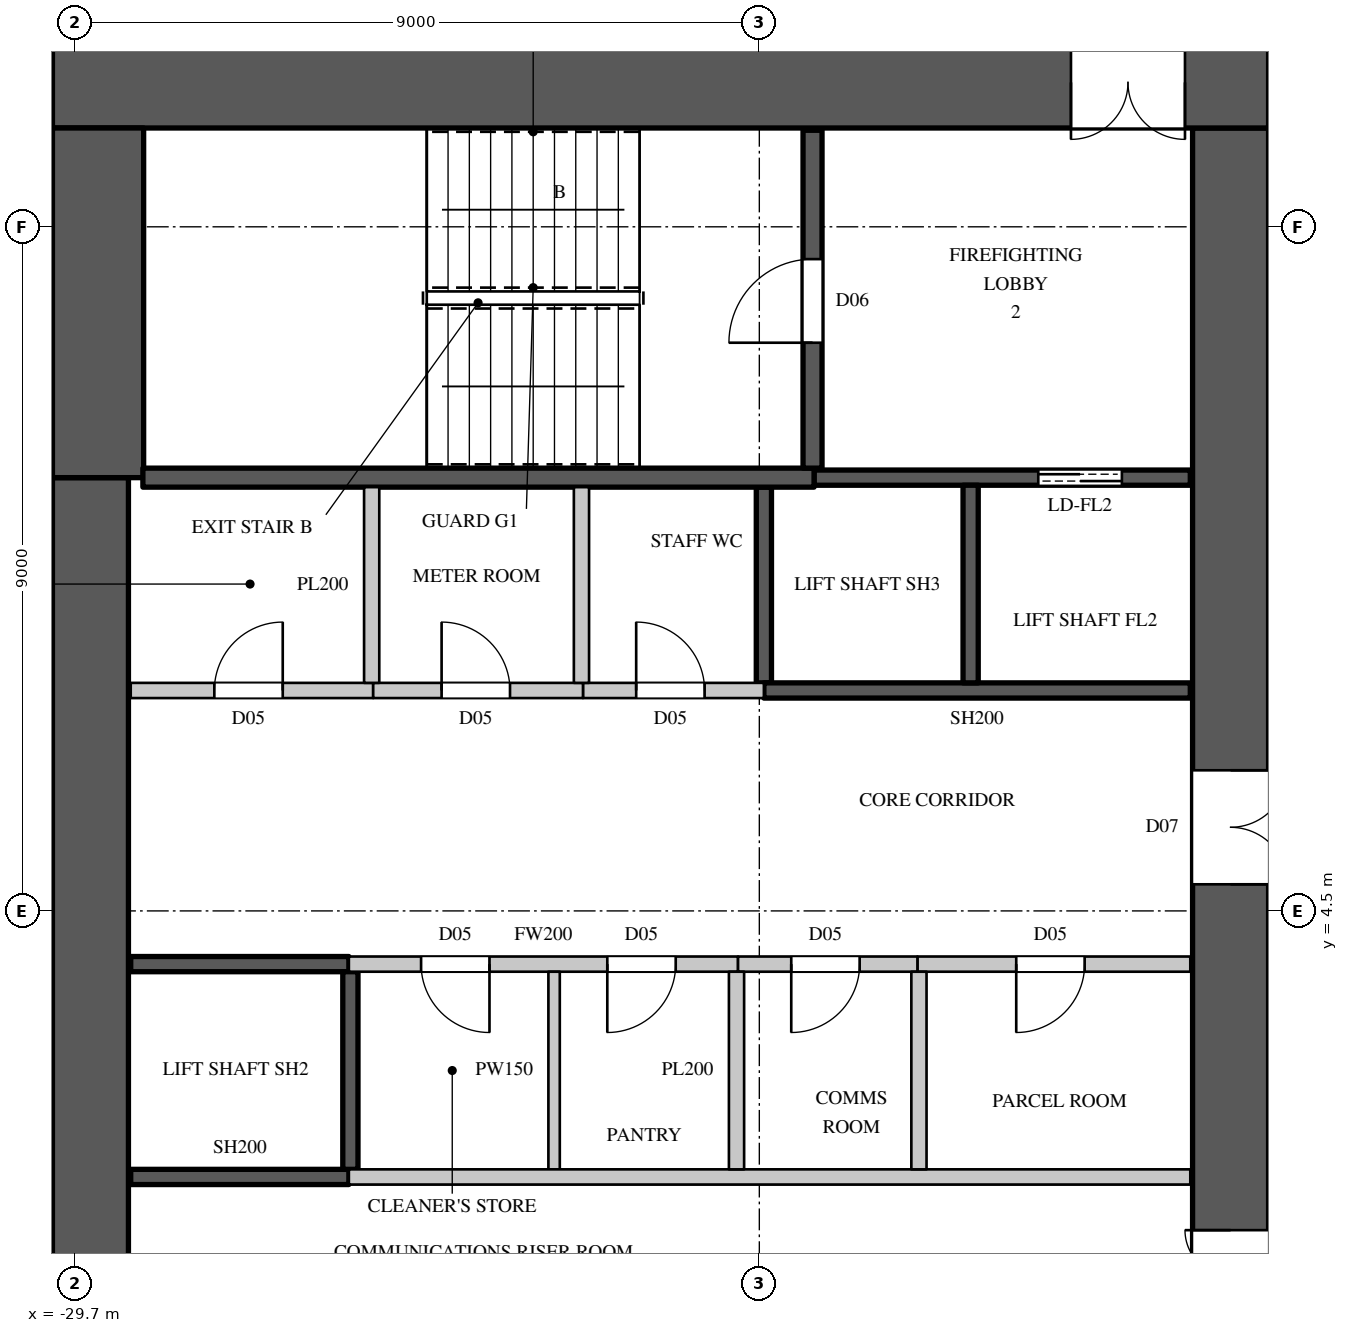
"""IFC4 building model, lengths in metres.
Left out: names, types, materials, properties, quantities, classifications, styles, units other than length and angle.
Written with IfcOpenShell. Run it as: python <this file> out.ifc"""

import sys

from ifc_helpers import new_model, si_unit, direction, frame, frame_2d, origin, place, context, subcontext, project, spatial, rectangle, extrude, element, fill, save


model = new_model("IFC4")
c1 = context("Model", 3, precision=1e-05, world=origin(), true_north=direction((0.0, 1.0)))
c2 = subcontext(c1, "Body", "Model", "MODEL_VIEW")
j1 = project(units=[si_unit("LENGTHUNIT", "METRE"), si_unit("PLANEANGLEUNIT", "RADIAN")], contexts=[c1])
p1 = place(None, origin())
s1 = spatial("IfcSite", under=j1, at=p1, CompositionType="ELEMENT")
p2 = place(p1, origin())
s2 = spatial("IfcBuilding", under=s1, at=p2, CompositionType="ELEMENT")
p3 = place(p2, frame((0.0, 0.0, 84.3)))
s3 = spatial("IfcBuildingStorey", under=s2, at=p3, CompositionType="ELEMENT", Elevation=84.3)
p4 = place(p3, frame((-30.0, 15.4, 0.0), z_axis=(0.0, 0.0, 1.0), x_axis=(1.0, 0.0, 0.0)))
e1 = element("IfcWall", 1, at=p4, inside=s3, PredefinedType="SHEAR", context=c2, shape_type="SweptSolid", body=[
    extrude(rectangle(XDim=16.0, YDim=1.2, at=frame_2d((8.0, 0.0))), origin(), (0.0, 0.0, 1.0), 3.6),
])
p5 = place(p4, frame((13.4, 0.0, 0.0)))
e2 = element("IfcOpeningElement", 2, at=p5, cuts=e1, PredefinedType="OPENING", context=c2, shape_type="SweptSolid", body=[
    extrude(rectangle(XDim=1.5, YDim=2.4, at=frame_2d((0.75, 1.2))), frame((0.0, 0.61, 0.0), z_axis=(0.0, -1.0, 0.0), x_axis=(1.0, 0.0, 0.0)), (0.0, 0.0, 1.0), 1.22),
])
p6 = place(p3, frame((-14.5, -14.8, 0.0), z_axis=(0.0, 0.0, 1.0), x_axis=(0.0, 1.0, 0.0)))
e3 = element("IfcWall", 3, at=p6, inside=s3, PredefinedType="SHEAR", context=c2, shape_type="SweptSolid", body=[
    extrude(rectangle(XDim=29.6, YDim=1.0, at=frame_2d((14.8, 0.0))), origin(), (0.0, 0.0, 1.0), 3.6),
])
p7 = place(p6, frame((8.45, 0.0, 0.0)))
e4 = element("IfcOpeningElement", 4, at=p7, cuts=e3, PredefinedType="OPENING", context=c2, shape_type="SweptSolid", body=[
    extrude(rectangle(XDim=1.5, YDim=2.4, at=frame_2d((0.75, 1.2))), frame((0.0, 0.51, 0.0), z_axis=(0.0, -1.0, 0.0), x_axis=(1.0, 0.0, 0.0)), (0.0, 0.0, 1.0), 1.02),
])
p8 = place(p6, frame((19.65, 0.0, 0.0)))
e5 = element("IfcOpeningElement", 5, at=p8, cuts=e3, PredefinedType="OPENING", context=c2, shape_type="SweptSolid", body=[
    extrude(rectangle(XDim=1.5, YDim=2.4, at=frame_2d((0.75, 1.2))), frame((0.0, 0.51, 0.0), z_axis=(0.0, -1.0, 0.0), x_axis=(1.0, 0.0, 0.0)), (0.0, 0.0, 1.0), 1.02),
])
p9 = place(p6, frame((14.5, 0.0, 0.0)))
e6 = element("IfcOpeningElement", 6, at=p9, cuts=e3, PredefinedType="OPENING", context=c2, shape_type="SweptSolid", body=[
    extrude(rectangle(XDim=0.6, YDim=2.0, at=frame_2d((0.3, 1.0))), frame((0.0, 0.51, 0.0), z_axis=(0.0, -1.0, 0.0), x_axis=(1.0, 0.0, 0.0)), (0.0, 0.0, 1.0), 1.02),
])
p10 = place(p3, frame((-29.5, -10.2, 0.0), z_axis=(0.0, 0.0, 1.0), x_axis=(0.0, 1.0, 0.0)))
e7 = element("IfcWall", 7, at=p10, inside=s3, PredefinedType="SHEAR", context=c2, shape_type="SweptSolid", body=[
    extrude(rectangle(XDim=20.4, YDim=1.0, at=frame_2d((10.2, 0.0))), origin(), (0.0, 0.0, 1.0), 3.6),
])
p11 = place(p3, frame((-29.4, 10.2, 0.0), z_axis=(0.0, 0.0, 1.0), x_axis=(0.0, 1.0, 0.0)))
e8 = element("IfcWall", 8, at=p11, inside=s3, PredefinedType="SHEAR", context=c2, shape_type="SweptSolid", body=[
    extrude(rectangle(XDim=4.6, YDim=1.2, at=frame_2d((2.3, 0.0))), origin(), (0.0, 0.0, 1.0), 3.6),
])
p12 = place(p3, frame((-28.97, 7.4, 0.0), z_axis=(0.0, 0.0, 1.0), x_axis=(1.0, 0.0, 0.0)))
e9 = element("IfcWall", 9, at=p12, inside=s3, PredefinedType="PARTITIONING", context=c2, shape_type="SweptSolid", body=[
    extrude(rectangle(XDim=3.19, YDim=0.2, at=frame_2d((1.595, 0.0))), origin(), (0.0, 0.0, 1.0), 3.3),
])
p13 = place(p12, frame((1.1, 0.0, 0.0)))
e10 = element("IfcOpeningElement", 10, at=p13, cuts=e9, PredefinedType="OPENING", context=c2, shape_type="SweptSolid", body=[
    extrude(rectangle(XDim=0.9, YDim=2.2, at=frame_2d((0.45, 1.1))), frame((0.0, 0.11, 0.0), z_axis=(0.0, -1.0, 0.0), x_axis=(1.0, 0.0, 0.0)), (0.0, 0.0, 1.0), 0.22),
])
p14 = place(p3, frame((-26.1, 3.8, 0.0), z_axis=(0.0, 0.0, 1.0), x_axis=(1.0, 0.0, 0.0)))
e11 = element("IfcWall", 11, at=p14, inside=s3, PredefinedType="PARTITIONING", context=c2, shape_type="SweptSolid", body=[
    extrude(rectangle(XDim=5.12, YDim=0.2, at=frame_2d((2.56, 0.0))), origin(), (0.0, 0.0, 1.0), 3.3),
])
p15 = place(p14, frame((0.95, 0.0, 0.0)))
e12 = element("IfcOpeningElement", 12, at=p15, cuts=e11, PredefinedType="OPENING", context=c2, shape_type="SweptSolid", body=[
    extrude(rectangle(XDim=0.9, YDim=2.2, at=frame_2d((0.45, 1.1))), frame((0.0, 0.11, 0.0), z_axis=(0.0, -1.0, 0.0), x_axis=(1.0, 0.0, 0.0)), (0.0, 0.0, 1.0), 0.22),
])
p16 = place(p14, frame((3.4, 0.0, 0.0)))
e13 = element("IfcOpeningElement", 13, at=p16, cuts=e11, PredefinedType="OPENING", context=c2, shape_type="SweptSolid", body=[
    extrude(rectangle(XDim=0.9, YDim=2.2, at=frame_2d((0.45, 1.1))), frame((0.0, 0.11, 0.0), z_axis=(0.0, -1.0, 0.0), x_axis=(1.0, 0.0, 0.0)), (0.0, 0.0, 1.0), 0.22),
])
p17 = place(p3, frame((-23.02, 7.4, 0.0), z_axis=(0.0, 0.0, 1.0), x_axis=(1.0, 0.0, 0.0)))
e14 = element("IfcWall", 14, at=p17, inside=s3, PredefinedType="PARTITIONING", context=c2, shape_type="SweptSolid", body=[
    extrude(rectangle(XDim=2.38, YDim=0.2, at=frame_2d((1.19, 0.0))), origin(), (0.0, 0.0, 1.0), 3.3),
])
p18 = place(p17, frame((0.7, 0.0, 0.0)))
e15 = element("IfcOpeningElement", 15, at=p18, cuts=e14, PredefinedType="OPENING", context=c2, shape_type="SweptSolid", body=[
    extrude(rectangle(XDim=0.9, YDim=2.2, at=frame_2d((0.45, 1.1))), frame((0.0, 0.11, 0.0), z_axis=(0.0, -1.0, 0.0), x_axis=(1.0, 0.0, 0.0)), (0.0, 0.0, 1.0), 0.22),
])
p19 = place(p3, frame((-18.62, 3.8, 0.0), z_axis=(0.0, 0.0, 1.0), x_axis=(1.0, 0.0, 0.0)))
e16 = element("IfcWall", 16, at=p19, inside=s3, PredefinedType="PARTITIONING", context=c2, shape_type="SweptSolid", body=[
    extrude(rectangle(XDim=3.59, YDim=0.2, at=frame_2d((1.795, 0.0))), origin(), (0.0, 0.0, 1.0), 3.3),
])
p20 = place(p19, frame((1.3, 0.0, 0.0)))
e17 = element("IfcOpeningElement", 17, at=p20, cuts=e16, PredefinedType="OPENING", context=c2, shape_type="SweptSolid", body=[
    extrude(rectangle(XDim=0.9, YDim=2.2, at=frame_2d((0.45, 1.1))), frame((0.0, 0.11, 0.0), z_axis=(0.0, -1.0, 0.0), x_axis=(1.0, 0.0, 0.0)), (0.0, 0.0, 1.0), 0.22),
])
p21 = place(p3, frame((-23.4, 1.1, 0.0), z_axis=(0.0, 0.0, 1.0), x_axis=(0.0, 1.0, 0.0)))
e18 = element("IfcWall", 18, at=p21, inside=s3, PredefinedType="PARTITIONING", context=c2, shape_type="SweptSolid", body=[
    extrude(rectangle(XDim=2.6, YDim=0.15, at=frame_2d((1.3, 0.0))), origin(), (0.0, 0.0, 1.0), 3.3),
])
p22 = place(p3, frame((-26.1, 1.0, 0.0), z_axis=(0.0, 0.0, 1.0), x_axis=(1.0, 0.0, 0.0)))
e19 = element("IfcWall", 19, at=p22, inside=s3, PredefinedType="PARTITIONING", context=c2, shape_type="SweptSolid", body=[
    extrude(rectangle(XDim=11.07, YDim=0.2, at=frame_2d((5.535, 0.0))), origin(), (0.0, 0.0, 1.0), 3.3),
])
p23 = place(p3, frame((-25.78, 7.4, 0.0), z_axis=(0.0, 0.0, 1.0), x_axis=(1.0, 0.0, 0.0)))
e20 = element("IfcWall", 20, at=p23, inside=s3, PredefinedType="PARTITIONING", context=c2, shape_type="SweptSolid", body=[
    extrude(rectangle(XDim=2.76, YDim=0.2, at=frame_2d((1.38, 0.0))), origin(), (0.0, 0.0, 1.0), 3.3),
])
p24 = place(p23, frame((0.9, 0.0, 0.0)))
e21 = element("IfcOpeningElement", 21, at=p24, cuts=e20, PredefinedType="OPENING", context=c2, shape_type="SweptSolid", body=[
    extrude(rectangle(XDim=0.9, YDim=2.2, at=frame_2d((0.45, 1.1))), frame((0.0, 0.11, 0.0), z_axis=(0.0, -1.0, 0.0), x_axis=(1.0, 0.0, 0.0)), (0.0, 0.0, 1.0), 0.22),
])
for number, where, z_axis, x_axis in (
    (22, (-25.8, 7.5, 0.0), (0.0, 0.0, 1.0), (0.0, 1.0, 0.0)),
    (23, (-23.04, 7.5, 0.0), (0.0, 0.0, 1.0), (0.0, 1.0, 0.0)),
):
    element("IfcWall", number, at=place(p3, frame(where, z_axis=z_axis, x_axis=x_axis)), inside=s3, PredefinedType="PARTITIONING", context=c2, shape_type="SweptSolid", body=[
        extrude(rectangle(XDim=2.575, YDim=0.2, at=frame_2d((1.288, 0.0))), origin(), (0.0, 0.0, 1.0), 3.3),
    ])
p25 = place(p3, frame((-20.98, 3.8, 0.0), z_axis=(0.0, 0.0, 1.0), x_axis=(1.0, 0.0, 0.0)))
e24 = element("IfcWall", 24, at=p25, inside=s3, PredefinedType="PARTITIONING", context=c2, shape_type="SweptSolid", body=[
    extrude(rectangle(XDim=2.36, YDim=0.2, at=frame_2d((1.18, 0.0))), origin(), (0.0, 0.0, 1.0), 3.3),
])
p26 = place(p25, frame((0.7, 0.0, 0.0)))
e25 = element("IfcOpeningElement", 25, at=p26, cuts=e24, PredefinedType="OPENING", context=c2, shape_type="SweptSolid", body=[
    extrude(rectangle(XDim=0.9, YDim=2.2, at=frame_2d((0.45, 1.1))), frame((0.0, 0.11, 0.0), z_axis=(0.0, -1.0, 0.0), x_axis=(1.0, 0.0, 0.0)), (0.0, 0.0, 1.0), 0.22),
])
for number, where, z_axis, x_axis in (
    (26, (-21.0, 1.1, 0.0), (0.0, 0.0, 1.0), (0.0, 1.0, 0.0)),
    (27, (-18.6, 1.1, 0.0), (0.0, 0.0, 1.0), (0.0, 1.0, 0.0)),
):
    element("IfcWall", number, at=place(p3, frame(where, z_axis=z_axis, x_axis=x_axis)), inside=s3, PredefinedType="PARTITIONING", context=c2, shape_type="SweptSolid", body=[
        extrude(rectangle(XDim=2.6, YDim=0.2, at=frame_2d((1.3, 0.0))), origin(), (0.0, 0.0, 1.0), 3.3),
    ])
for number, where, z_axis, x_axis in (
    (28, (-28.97, 1.0, 0.0), (0.0, 0.0, 1.0), (1.0, 0.0, 0.0)),
    (29, (-28.97, 3.8, 0.0), (0.0, 0.0, 1.0), (1.0, 0.0, 0.0)),
):
    element("IfcWall", number, at=place(p3, frame(where, z_axis=z_axis, x_axis=x_axis)), inside=s3, PredefinedType="SHEAR", context=c2, shape_type="SweptSolid", body=[
        extrude(rectangle(XDim=2.87, YDim=0.2, at=frame_2d((1.435, 0.0))), origin(), (0.0, 0.0, 1.0), 3.3),
    ])
p27 = place(p3, frame((-26.08, 1.1, 0.0), z_axis=(0.0, 0.0, 1.0), x_axis=(0.0, 1.0, 0.0)))
e30 = element("IfcWall", 30, at=p27, inside=s3, PredefinedType="SHEAR", context=c2, shape_type="SweptSolid", body=[
    extrude(rectangle(XDim=2.6, YDim=0.2, at=frame_2d((1.3, 0.0))), origin(), (0.0, 0.0, 1.0), 3.3),
])
p28 = place(p3, frame((-20.64, 7.5, 0.0), z_axis=(0.0, 0.0, 1.0), x_axis=(0.0, 1.0, 0.0)))
e31 = element("IfcWall", 31, at=p28, inside=s3, PredefinedType="SHEAR", context=c2, shape_type="SweptSolid", body=[
    extrude(rectangle(XDim=2.575, YDim=0.2, at=frame_2d((1.288, 0.0))), origin(), (0.0, 0.0, 1.0), 3.3),
])
p29 = place(p3, frame((-20.64, 7.4, 0.0), z_axis=(0.0, 0.0, 1.0), x_axis=(1.0, 0.0, 0.0)))
e32 = element("IfcWall", 32, at=p29, inside=s3, PredefinedType="SHEAR", context=c2, shape_type="SweptSolid", body=[
    extrude(rectangle(XDim=5.61, YDim=0.2, at=frame_2d((2.805, 0.0))), origin(), (0.0, 0.0, 1.0), 3.3),
])
p30 = place(p3, frame((-19.98, 10.2, 0.0), z_axis=(0.0, 0.0, 1.0), x_axis=(1.0, 0.0, 0.0)))
e33 = element("IfcWall", 33, at=p30, inside=s3, PredefinedType="SHEAR", context=c2, shape_type="SweptSolid", body=[
    extrude(rectangle(XDim=4.95, YDim=0.2, at=frame_2d((2.475, 0.0))), origin(), (0.0, 0.0, 1.0), 3.3),
])
p31 = place(p30, frame((2.95, 0.0, 0.0)))
e34 = element("IfcOpeningElement", 34, at=p31, cuts=e33, PredefinedType="OPENING", context=c2, shape_type="SweptSolid", body=[
    extrude(rectangle(XDim=1.1, YDim=2.2, at=frame_2d((0.55, 1.1))), frame((0.0, 0.11, 0.0), z_axis=(0.0, -1.0, 0.0), x_axis=(1.0, 0.0, 0.0)), (0.0, 0.0, 1.0), 0.22),
])
p32 = place(p3, frame((-17.92, 7.5, 0.0), z_axis=(0.0, 0.0, 1.0), x_axis=(0.0, 1.0, 0.0)))
e35 = element("IfcWall", 35, at=p32, inside=s3, PredefinedType="SHEAR", context=c2, shape_type="SweptSolid", body=[
    extrude(rectangle(XDim=2.6, YDim=0.2, at=frame_2d((1.3, 0.0))), origin(), (0.0, 0.0, 1.0), 3.6),
])
p33 = place(p3, frame((-28.81, 10.2, 0.0), z_axis=(0.0, 0.0, 1.0), x_axis=(1.0, 0.0, 0.0)))
e36 = element("IfcWall", 36, at=p33, inside=s3, PredefinedType="SHEAR", context=c2, shape_type="SweptSolid", body=[
    extrude(rectangle(XDim=8.83, YDim=0.25, at=frame_2d((4.415, 0.0))), origin(), (0.0, 0.0, 1.0), 3.3),
])
p34 = place(p3, frame((-20.0, 10.325, 0.0), z_axis=(0.0, 0.0, 1.0), x_axis=(0.0, 1.0, 0.0)))
e37 = element("IfcWall", 37, at=p34, inside=s3, PredefinedType="SHEAR", context=c2, shape_type="SweptSolid", body=[
    extrude(rectangle(XDim=4.445, YDim=0.25, at=frame_2d((2.223, 0.0))), origin(), (0.0, 0.0, 1.0), 3.3),
])
p35 = place(p34, frame((1.65, 0.0, 0.0)))
e38 = element("IfcOpeningElement", 38, at=p35, cuts=e37, PredefinedType="OPENING", context=c2, shape_type="SweptSolid", body=[
    extrude(rectangle(XDim=1.1, YDim=2.2, at=frame_2d((0.55, 1.1))), frame((0.0, 0.135, 0.0), z_axis=(0.0, -1.0, 0.0), x_axis=(1.0, 0.0, 0.0)), (0.0, 0.0, 1.0), 0.27),
])
p36 = place(p35, origin())
e39 = element("IfcDoor", 39, at=p36, inside=s3, OperationType="SINGLE_SWING_LEFT", PredefinedType="DOOR", context=c2, shape_type="SweptSolid", body=[
    extrude(rectangle(XDim=1.1, YDim=2.2, at=frame_2d((0.55, 1.1))), frame((0.0, 0.025, 0.0), z_axis=(0.0, -1.0, 0.0), x_axis=(1.0, 0.0, 0.0)), (0.0, 0.0, 1.0), 0.05),
])
fill(e38, e39)
p37 = place(p15, origin())
e40 = element("IfcDoor", 40, at=p37, inside=s3, OperationType="SINGLE_SWING_LEFT", PredefinedType="DOOR", context=c2, shape_type="SweptSolid", body=[
    extrude(rectangle(XDim=0.9, YDim=2.2, at=frame_2d((0.45, 1.1))), frame((0.0, 0.025, 0.0), z_axis=(0.0, -1.0, 0.0), x_axis=(1.0, 0.0, 0.0)), (0.0, 0.0, 1.0), 0.05),
])
fill(e12, e40)
p38 = place(p16, origin())
e41 = element("IfcDoor", 41, at=p38, inside=s3, OperationType="SINGLE_SWING_RIGHT", PredefinedType="DOOR", context=c2, shape_type="SweptSolid", body=[
    extrude(rectangle(XDim=0.9, YDim=2.2, at=frame_2d((0.45, 1.1))), frame((0.0, 0.025, 0.0), z_axis=(0.0, -1.0, 0.0), x_axis=(1.0, 0.0, 0.0)), (0.0, 0.0, 1.0), 0.05),
])
fill(e13, e41)
p39 = place(p26, origin())
e42 = element("IfcDoor", 42, at=p39, inside=s3, OperationType="SINGLE_SWING_RIGHT", PredefinedType="DOOR", context=c2, shape_type="SweptSolid", body=[
    extrude(rectangle(XDim=0.9, YDim=2.2, at=frame_2d((0.45, 1.1))), frame((0.0, 0.025, 0.0), z_axis=(0.0, -1.0, 0.0), x_axis=(1.0, 0.0, 0.0)), (0.0, 0.0, 1.0), 0.05),
])
fill(e25, e42)
p40 = place(p20, origin())
e43 = element("IfcDoor", 43, at=p40, inside=s3, OperationType="SINGLE_SWING_RIGHT", PredefinedType="DOOR", context=c2, shape_type="SweptSolid", body=[
    extrude(rectangle(XDim=0.9, YDim=2.2, at=frame_2d((0.45, 1.1))), frame((0.0, 0.025, 0.0), z_axis=(0.0, -1.0, 0.0), x_axis=(1.0, 0.0, 0.0)), (0.0, 0.0, 1.0), 0.05),
])
fill(e17, e43)
p41 = place(p13, origin())
e44 = element("IfcDoor", 44, at=p41, inside=s3, OperationType="SINGLE_SWING_RIGHT", PredefinedType="DOOR", context=c2, shape_type="SweptSolid", body=[
    extrude(rectangle(XDim=0.9, YDim=2.2, at=frame_2d((0.45, 1.1))), frame((0.0, 0.025, 0.0), z_axis=(0.0, -1.0, 0.0), x_axis=(1.0, 0.0, 0.0)), (0.0, 0.0, 1.0), 0.05),
])
fill(e10, e44)
p42 = place(p24, origin())
e45 = element("IfcDoor", 45, at=p42, inside=s3, OperationType="SINGLE_SWING_LEFT", PredefinedType="DOOR", context=c2, shape_type="SweptSolid", body=[
    extrude(rectangle(XDim=0.9, YDim=2.2, at=frame_2d((0.45, 1.1))), frame((0.0, 0.025, 0.0), z_axis=(0.0, -1.0, 0.0), x_axis=(1.0, 0.0, 0.0)), (0.0, 0.0, 1.0), 0.05),
])
fill(e21, e45)
p43 = place(p18, origin())
e46 = element("IfcDoor", 46, at=p43, inside=s3, OperationType="SINGLE_SWING_LEFT", PredefinedType="DOOR", context=c2, shape_type="SweptSolid", body=[
    extrude(rectangle(XDim=0.9, YDim=2.2, at=frame_2d((0.45, 1.1))), frame((0.0, 0.025, 0.0), z_axis=(0.0, -1.0, 0.0), x_axis=(1.0, 0.0, 0.0)), (0.0, 0.0, 1.0), 0.05),
])
fill(e15, e46)
p44 = place(p31, origin())
e47 = element("IfcDoor", 47, at=p44, inside=s3, OperationType="DOUBLE_DOOR_SLIDING", PredefinedType="DOOR", context=c2, shape_type="SweptSolid", body=[
    extrude(rectangle(XDim=1.1, YDim=2.2, at=frame_2d((0.55, 1.1))), frame((0.0, 0.025, 0.0), z_axis=(0.0, -1.0, 0.0), x_axis=(1.0, 0.0, 0.0)), (0.0, 0.0, 1.0), 0.05),
])
fill(e34, e47)
p45 = place(p5, origin())
e48 = element("IfcDoor", 48, at=p45, inside=s3, OperationType="DOUBLE_DOOR_SINGLE_SWING", PredefinedType="DOOR", context=c2, shape_type="SweptSolid", body=[
    extrude(rectangle(XDim=1.5, YDim=2.4, at=frame_2d((0.75, 1.2))), frame((0.0, 0.025, 0.0), z_axis=(0.0, -1.0, 0.0), x_axis=(1.0, 0.0, 0.0)), (0.0, 0.0, 1.0), 0.05),
])
fill(e2, e48)
p46 = place(p8, origin())
e49 = element("IfcDoor", 49, at=p46, inside=s3, OperationType="DOUBLE_DOOR_SINGLE_SWING", PredefinedType="DOOR", context=c2, shape_type="SweptSolid", body=[
    extrude(rectangle(XDim=1.5, YDim=2.4, at=frame_2d((0.75, 1.2))), frame((0.0, -0.445, 0.0), z_axis=(0.0, -1.0, 0.0), x_axis=(1.0, 0.0, 0.0)), (0.0, 0.0, 1.0), 0.05),
])
fill(e5, e49)
p47 = place(p9, origin())
e50 = element("IfcDoor", 50, at=p47, inside=s3, OperationType="SINGLE_SWING_RIGHT", PredefinedType="DOOR", context=c2, shape_type="SweptSolid", body=[
    extrude(rectangle(XDim=0.6, YDim=2.0, at=frame_2d((0.3, 1.0))), frame((0.0, 0.495, 0.0), z_axis=(0.0, -1.0, 0.0), x_axis=(1.0, 0.0, 0.0)), (0.0, 0.0, 1.0), 0.05),
])
fill(e6, e50)
save(model, sys.argv[1])
